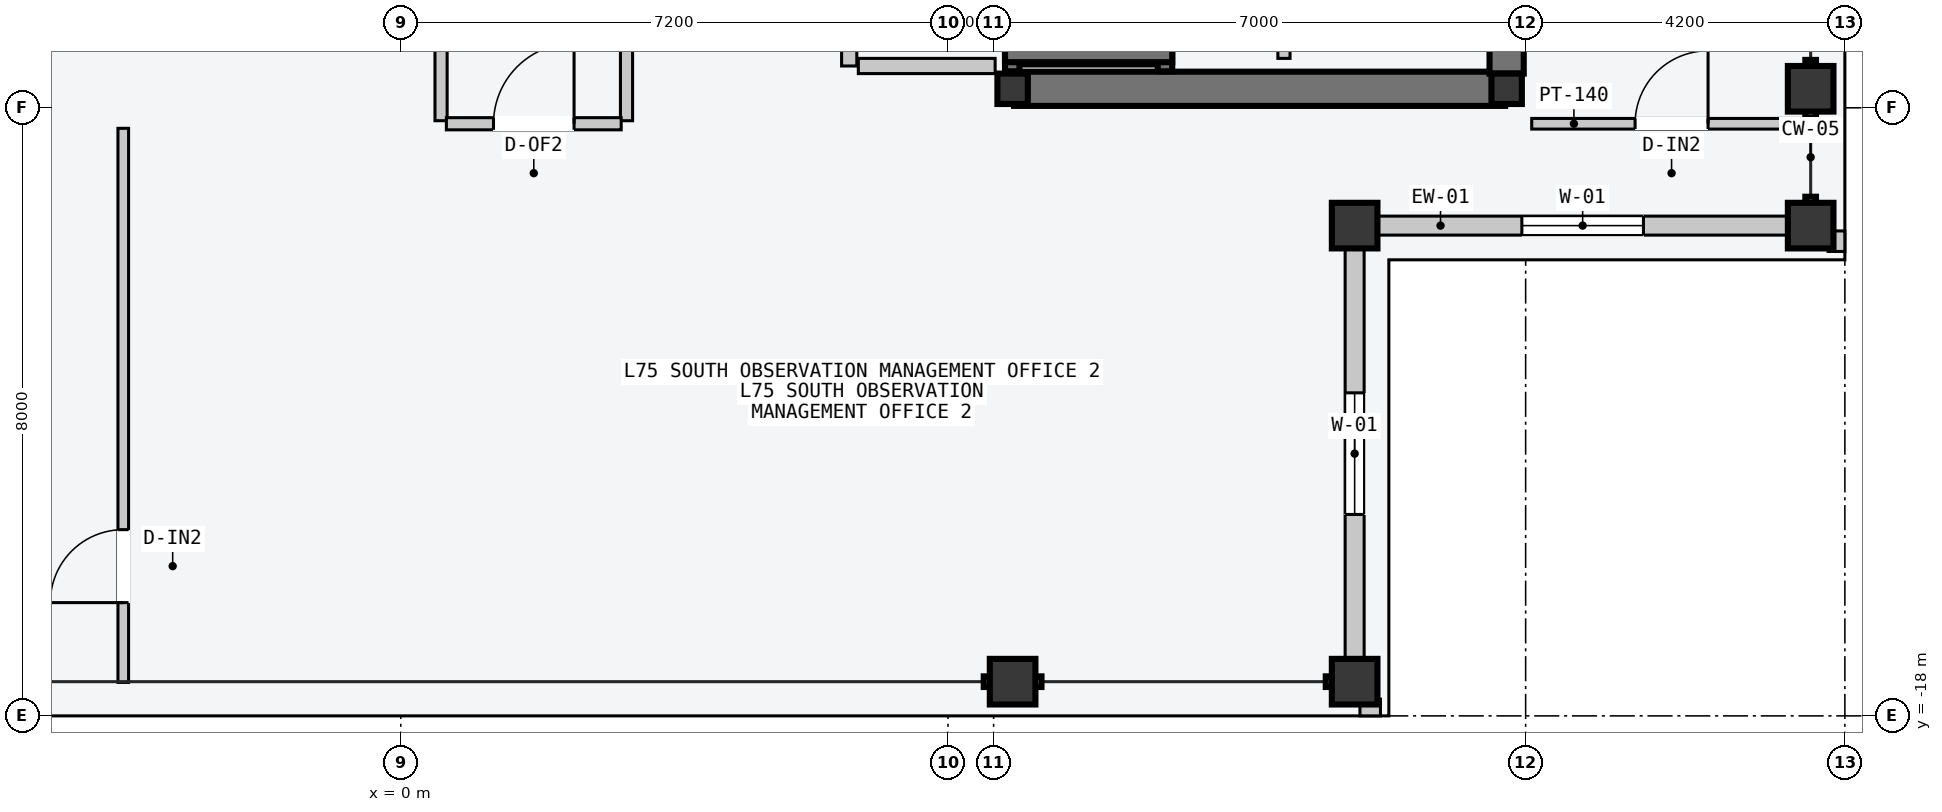
"""IFC4 building model, lengths in metres.
Left out: names, types, materials, properties, quantities, classifications, styles, units other than length and angle.
Written with IfcOpenShell. Run it as: python <this file> out.ifc"""

import sys

from ifc_helpers import new_model, si_unit, direction, frame, frame_2d, origin, origin_2d, place, context, subcontext, project, spatial, rectangle, hollow_rectangle, i_section, extrude, element, fill, save


model = new_model("IFC4")
c1 = context("Model", 3, precision=1e-05, world=origin(), true_north=direction((0.0, 1.0)))
c2 = subcontext(c1, "Body", "Model", "MODEL_VIEW")
j1 = project(units=[si_unit("LENGTHUNIT", "METRE"), si_unit("PLANEANGLEUNIT", "RADIAN")], contexts=[c1])
p1 = place(None, origin())
s1 = spatial("IfcSite", under=j1, at=p1, CompositionType="ELEMENT")
p2 = place(p1, origin())
s2 = spatial("IfcBuilding", under=s1, at=p2, CompositionType="ELEMENT")
p3 = place(p2, frame((0.0, 0.0, 284.4)))
s3 = spatial("IfcBuildingStorey", under=s2, at=p3, CompositionType="ELEMENT", Elevation=284.4)
p4 = place(p3, frame((8.07, -9.75, -0.2), z_axis=(0.0, 0.0, 1.0), x_axis=(1.0, 0.0, 0.0)))
e1 = element("IfcWall", 1, at=p4, inside=s3, PredefinedType="SHEAR", context=c2, shape_type="SweptSolid", body=[
    extrude(rectangle(XDim=6.46, YDim=0.45, at=frame_2d((3.23, 0.0))), origin(), (0.0, 0.0, 1.0), 4.8),
])
p5 = place(p3, frame((14.55, -9.55, -0.2), z_axis=(0.0, 0.0, 1.0), x_axis=(0.0, 1.0, 0.0)))
e2 = element("IfcWall", 2, at=p5, inside=s3, PredefinedType="SHEAR", context=c2, shape_type="SweptSolid", body=[
    extrude(rectangle(XDim=9.35, YDim=0.45, at=frame_2d((4.675, 0.0))), origin(), (0.0, 0.0, 1.0), 4.8),
])
for number, where, z_axis, x_axis in (
    (3, (8.05, -9.75, 0.0), (0.0, 0.0, 1.0), (1.0, 0.0, 0.0)),
    (4, (14.55, -9.75, 0.0), (0.0, 0.0, 1.0), (1.0, 0.0, 0.0)),
):
    element("IfcColumn", number, at=place(p3, frame(where, z_axis=z_axis, x_axis=x_axis)), inside=s3, PredefinedType="COLUMN", context=c2, shape_type="SweptSolid", body=[
        extrude(i_section(OverallWidth=0.4, OverallDepth=0.4, WebThickness=0.013, FlangeThickness=0.021, at=origin_2d()), origin(), (0.0, 0.0, 1.0), 4.8),
    ])
for number, where, z_axis, x_axis in (
    (5, (8.05, -17.55, 0.0), (0.0, 0.0, 1.0), (1.0, 0.0, 0.0)),
    (6, (12.55, -17.55, 0.0), (0.0, 0.0, 1.0), (1.0, 0.0, 0.0)),
    (7, (18.55, -11.55, 0.0), (0.0, 0.0, 1.0), (0.0, 1.0, 0.0)),
    (8, (18.55, -9.75, 0.0), (0.0, 0.0, 1.0), (0.0, 1.0, 0.0)),
    (9, (12.55, -11.55, 0.0), (0.0, 0.0, 1.0), (1.0, 0.0, 0.0)),
):
    element("IfcColumn", number, at=place(p3, frame(where, z_axis=z_axis, x_axis=x_axis)), inside=s3, PredefinedType="COLUMN", context=c2, shape_type="SweptSolid", body=[
        extrude(hollow_rectangle(XDim=0.6, YDim=0.6, WallThickness=0.025, at=origin_2d()), origin(), (0.0, 0.0, 1.0), 4.8),
    ])
p6 = place(p3, frame((12.86, -11.55, 0.0), z_axis=(0.0, 0.0, 1.0), x_axis=(1.0, 0.0, 0.0)))
e10 = element("IfcWall", 10, at=p6, inside=s3, PredefinedType="STANDARD", context=c2, shape_type="SweptSolid", body=[
    extrude(rectangle(XDim=5.38, YDim=0.25, at=frame_2d((2.69, 0.0))), origin(), (0.0, 0.0, 1.0), 4.05),
])
p7 = place(p6, frame((1.89, 0.0, 0.85)))
e11 = element("IfcOpeningElement", 11, at=p7, cuts=e10, PredefinedType="OPENING", context=c2, shape_type="SweptSolid", body=[
    extrude(rectangle(XDim=1.6, YDim=2.0, at=frame_2d((0.8, 1.0))), frame((0.0, 0.135, 0.0), z_axis=(0.0, -1.0, 0.0), x_axis=(1.0, 0.0, 0.0)), (0.0, 0.0, 1.0), 0.27),
])
p8 = place(p3, frame((12.55, -17.24, 0.0), z_axis=(0.0, 0.0, 1.0), x_axis=(0.0, 1.0, 0.0)))
e12 = element("IfcWall", 12, at=p8, inside=s3, PredefinedType="STANDARD", context=c2, shape_type="SweptSolid", body=[
    extrude(rectangle(XDim=5.38, YDim=0.25, at=frame_2d((2.69, 0.0))), origin(), (0.0, 0.0, 1.0), 4.05),
])
p9 = place(p8, frame((1.89, 0.0, 0.85)))
e13 = element("IfcOpeningElement", 13, at=p9, cuts=e12, PredefinedType="OPENING", context=c2, shape_type="SweptSolid", body=[
    extrude(rectangle(XDim=1.6, YDim=2.0, at=frame_2d((0.8, 1.0))), frame((0.0, 0.135, 0.0), z_axis=(0.0, -1.0, 0.0), x_axis=(1.0, 0.0, 0.0)), (0.0, 0.0, 1.0), 0.27),
])
for number, where, z_axis, x_axis in (
    (14, (12.62, -17.89, 0.0), (0.0, 0.0, 1.0), (1.0, 0.0, 0.0)),
    (15, (18.89, -11.89, 0.0), (0.0, 0.0, 1.0), (0.0, 1.0, 0.0)),
):
    element("IfcWall", number, at=place(p3, frame(where, z_axis=z_axis, x_axis=x_axis)), inside=s3, PredefinedType="PARAPET", context=c2, shape_type="SweptSolid", body=[
        extrude(rectangle(XDim=0.27, YDim=0.22, at=frame_2d((0.135, 0.0))), origin(), (0.0, 0.0, 1.0), 1.2),
    ])
p10 = place(p3, frame((8.045, -9.52, -0.2), z_axis=(0.0, 0.0, 1.0), x_axis=(0.0, 1.0, 0.0)))
e16 = element("IfcWall", 16, at=p10, inside=s3, PredefinedType="SOLIDWALL", context=c2, shape_type="SweptSolid", body=[
    extrude(rectangle(XDim=2.12, YDim=0.19, at=frame_2d((1.06, 0.0))), origin(), (0.0, 0.0, 1.0), 4.8),
])
p11 = place(p10, frame((0.57, 0.0, 0.2)))
e17 = element("IfcOpeningElement", 17, at=p11, cuts=e16, PredefinedType="OPENING", context=c2, shape_type="SweptSolid", body=[
    extrude(rectangle(XDim=1.1, YDim=2.2, at=frame_2d((0.55, 1.1))), frame((0.0, 0.105, 0.0), z_axis=(0.0, -1.0, 0.0), x_axis=(1.0, 0.0, 0.0)), (0.0, 0.0, 1.0), 0.21),
])
p12 = place(p3, frame((10.055, -9.52, -0.2), z_axis=(0.0, 0.0, 1.0), x_axis=(0.0, 1.0, 0.0)))
e18 = element("IfcWall", 18, at=p12, inside=s3, PredefinedType="SOLIDWALL", context=c2, shape_type="SweptSolid", body=[
    extrude(rectangle(XDim=2.12, YDim=0.19, at=frame_2d((1.06, 0.0))), origin(), (0.0, 0.0, 1.0), 4.8),
])
p13 = place(p3, frame((7.95, -9.305, -0.2), z_axis=(0.0, 0.0, 1.0), x_axis=(1.0, 0.0, 0.0)))
e19 = element("IfcWall", 19, at=p13, inside=s3, PredefinedType="SOLIDWALL", context=c2, shape_type="SweptSolid", body=[
    extrude(rectangle(XDim=2.2, YDim=0.19, at=frame_2d((1.1, 0.0))), origin(), (0.0, 0.0, 1.0), 4.8),
])
p14 = place(p3, frame((5.9, -9.45, 0.0), z_axis=(0.0, 0.0, 1.0), x_axis=(0.0, 1.0, 0.0)))
e20 = element("IfcWall", 20, at=p14, inside=s3, PredefinedType="PARTITIONING", context=c2, shape_type="SweptSolid", body=[
    extrude(rectangle(XDim=10.5, YDim=0.2, at=frame_2d((5.25, 0.0))), origin(), (0.0, 0.0, 1.0), 4.6),
])
p15 = place(p14, frame((3.9, 0.0, 0.0)))
e21 = element("IfcOpeningElement", 21, at=p15, cuts=e20, PredefinedType="OPENING", context=c2, shape_type="SweptSolid", body=[
    extrude(rectangle(XDim=1.5, YDim=2.2, at=frame_2d((0.75, 1.1))), frame((0.0, 0.11, 0.0), z_axis=(0.0, -1.0, 0.0), x_axis=(1.0, 0.0, 0.0)), (0.0, 0.0, 1.0), 0.22),
])
p16 = place(p3, frame((6.02, -9.45, 0.0), z_axis=(0.0, 0.0, 1.0), x_axis=(1.0, 0.0, 0.0)))
e22 = element("IfcWall", 22, at=p16, inside=s3, PredefinedType="PARTITIONING", context=c2, shape_type="SweptSolid", body=[
    extrude(rectangle(XDim=1.8, YDim=0.2, at=frame_2d((0.9, 0.0))), origin(), (0.0, 0.0, 1.0), 4.6),
])
p17 = place(p3, frame((11.62, -9.35, 0.0), z_axis=(0.0, 0.0, 1.0), x_axis=(0.0, 1.0, 0.0)))
e23 = element("IfcWall", 23, at=p17, inside=s3, PredefinedType="PARTITIONING", context=c2, shape_type="SweptSolid", body=[
    extrude(rectangle(XDim=3.85, YDim=0.16, at=frame_2d((1.925, 0.0))), origin(), (0.0, 0.0, 1.0), 4.6),
])
p18 = place(p17, frame((0.512, 0.0, 0.0)))
e24 = element("IfcOpeningElement", 24, at=p18, cuts=e23, PredefinedType="OPENING", context=c2, shape_type="SweptSolid", body=[
    extrude(rectangle(XDim=0.9, YDim=2.15, at=frame_2d((0.45, 1.075))), frame((0.0, 0.09, 0.0), z_axis=(0.0, -1.0, 0.0), x_axis=(1.0, 0.0, 0.0)), (0.0, 0.0, 1.0), 0.18),
])
p19 = place(p17, frame((2.438, 0.0, 0.0)))
e25 = element("IfcOpeningElement", 25, at=p19, cuts=e23, PredefinedType="OPENING", context=c2, shape_type="SweptSolid", body=[
    extrude(rectangle(XDim=0.9, YDim=2.15, at=frame_2d((0.45, 1.075))), frame((0.0, 0.09, 0.0), z_axis=(0.0, -1.0, 0.0), x_axis=(1.0, 0.0, 0.0)), (0.0, 0.0, 1.0), 0.18),
])
p20 = place(p3, frame((0.53, -10.17, 0.0), z_axis=(0.0, 0.0, 1.0), x_axis=(0.0, 1.0, 0.0)))
e26 = element("IfcWall", 26, at=p20, inside=s3, PredefinedType="PARTITIONING", context=c2, shape_type="SweptSolid", body=[
    extrude(rectangle(XDim=4.49, YDim=0.16, at=frame_2d((2.245, 0.0))), origin(), (0.0, 0.0, 1.0), 4.6),
])
p21 = place(p20, frame((1.15, 0.0, 0.0)))
e27 = element("IfcOpeningElement", 27, at=p21, cuts=e26, PredefinedType="OPENING", context=c2, shape_type="SweptSolid", body=[
    extrude(rectangle(XDim=0.96, YDim=2.18, at=frame_2d((0.48, 1.09))), frame((0.0, 0.09, 0.0), z_axis=(0.0, -1.0, 0.0), x_axis=(1.0, 0.0, 0.0)), (0.0, 0.0, 1.0), 0.18),
])
p22 = place(p3, frame((2.97, -10.17, 0.0), z_axis=(0.0, 0.0, 1.0), x_axis=(0.0, 1.0, 0.0)))
e28 = element("IfcWall", 28, at=p22, inside=s3, PredefinedType="PARTITIONING", context=c2, shape_type="SweptSolid", body=[
    extrude(rectangle(XDim=4.49, YDim=0.16, at=frame_2d((2.245, 0.0))), origin(), (0.0, 0.0, 1.0), 4.6),
])
p23 = place(p22, frame((1.15, 0.0, 0.0)))
e29 = element("IfcOpeningElement", 29, at=p23, cuts=e28, PredefinedType="OPENING", context=c2, shape_type="SweptSolid", body=[
    extrude(rectangle(XDim=0.96, YDim=2.18, at=frame_2d((0.48, 1.09))), frame((0.0, 0.09, 0.0), z_axis=(0.0, -1.0, 0.0), x_axis=(1.0, 0.0, 0.0)), (0.0, 0.0, 1.0), 0.18),
])
p24 = place(p3, frame((-3.651, -17.56, 0.0), z_axis=(0.0, 0.0, 1.0), x_axis=(0.0, 1.0, 0.0)))
e30 = element("IfcWall", 30, at=p24, inside=s3, PredefinedType="PARTITIONING", context=c2, shape_type="SweptSolid", body=[
    extrude(rectangle(XDim=7.29, YDim=0.14, at=frame_2d((3.645, 0.0))), origin(), (0.0, 0.0, 1.0), 4.6),
])
p25 = place(p24, frame((1.05, 0.0, 0.0)))
e31 = element("IfcOpeningElement", 31, at=p25, cuts=e30, PredefinedType="OPENING", context=c2, shape_type="SweptSolid", body=[
    extrude(rectangle(XDim=0.96, YDim=2.18, at=frame_2d((0.48, 1.09))), frame((0.0, 0.08, 0.0), z_axis=(0.0, -1.0, 0.0), x_axis=(1.0, 0.0, 0.0)), (0.0, 0.0, 1.0), 0.16),
])
p26 = place(p3, frame((0.6, -10.21, 0.0), z_axis=(0.0, 0.0, 1.0), x_axis=(1.0, 0.0, 0.0)))
e32 = element("IfcWall", 32, at=p26, inside=s3, PredefinedType="PARTITIONING", context=c2, shape_type="SweptSolid", body=[
    extrude(rectangle(XDim=2.3, YDim=0.16, at=frame_2d((1.15, 0.0))), origin(), (0.0, 0.0, 1.0), 4.6),
])
p27 = place(p26, frame((0.62, 0.0, 0.0)))
e33 = element("IfcOpeningElement", 33, at=p27, cuts=e32, PredefinedType="OPENING", context=c2, shape_type="SweptSolid", body=[
    extrude(rectangle(XDim=1.06, YDim=2.2, at=frame_2d((0.53, 1.1))), frame((0.0, 0.09, 0.0), z_axis=(0.0, -1.0, 0.0), x_axis=(1.0, 0.0, 0.0)), (0.0, 0.0, 1.0), 0.18),
])
p28 = place(p3, frame((14.88, -10.21, 0.0), z_axis=(0.0, 0.0, 1.0), x_axis=(1.0, 0.0, 0.0)))
e34 = element("IfcWall", 34, at=p28, inside=s3, PredefinedType="PARTITIONING", context=c2, shape_type="SweptSolid", body=[
    extrude(rectangle(XDim=3.68, YDim=0.14, at=frame_2d((1.84, 0.0))), origin(), (0.0, 0.0, 1.0), 4.6),
])
p29 = place(p28, frame((1.36, 0.0, 0.0)))
e35 = element("IfcOpeningElement", 35, at=p29, cuts=e34, PredefinedType="OPENING", context=c2, shape_type="SweptSolid", body=[
    extrude(rectangle(XDim=0.96, YDim=2.18, at=frame_2d((0.48, 1.09))), frame((0.0, 0.08, 0.0), z_axis=(0.0, -1.0, 0.0), x_axis=(1.0, 0.0, 0.0)), (0.0, 0.0, 1.0), 0.16),
])
p30 = place(p7, origin())
e36 = element("IfcWindow", 36, at=p30, inside=s3, PartitioningType="SINGLE_PANEL", PredefinedType="WINDOW", context=c2, shape_type="SweptSolid", body=[
    extrude(rectangle(XDim=1.6, YDim=2.0, at=frame_2d((0.8, 1.0))), frame((0.0, 0.03, 0.0), z_axis=(0.0, -1.0, 0.0), x_axis=(1.0, 0.0, 0.0)), (0.0, 0.0, 1.0), 0.06),
])
fill(e11, e36)
p31 = place(p9, origin())
e37 = element("IfcWindow", 37, at=p31, inside=s3, PartitioningType="SINGLE_PANEL", PredefinedType="WINDOW", context=c2, shape_type="SweptSolid", body=[
    extrude(rectangle(XDim=1.6, YDim=2.0, at=frame_2d((0.8, 1.0))), frame((0.0, 0.03, 0.0), z_axis=(0.0, -1.0, 0.0), x_axis=(1.0, 0.0, 0.0)), (0.0, 0.0, 1.0), 0.06),
])
fill(e13, e37)
p32 = place(p25, origin())
e38 = element("IfcDoor", 38, at=p32, inside=s3, OperationType="SINGLE_SWING_LEFT", PredefinedType="DOOR", context=c2, shape_type="SweptSolid", body=[
    extrude(rectangle(XDim=0.96, YDim=2.18, at=frame_2d((0.48, 1.09))), frame((0.0, 0.025, 0.0), z_axis=(0.0, -1.0, 0.0), x_axis=(1.0, 0.0, 0.0)), (0.0, 0.0, 1.0), 0.05),
])
fill(e31, e38)
p33 = place(p27, origin())
e39 = element("IfcDoor", 39, at=p33, inside=s3, OperationType="SINGLE_SWING_RIGHT", PredefinedType="DOOR", context=c2, shape_type="SweptSolid", body=[
    extrude(rectangle(XDim=1.06, YDim=2.2, at=frame_2d((0.53, 1.1))), frame((0.0, 0.025, 0.0), z_axis=(0.0, -1.0, 0.0), x_axis=(1.0, 0.0, 0.0)), (0.0, 0.0, 1.0), 0.05),
])
fill(e33, e39)
p34 = place(p29, origin())
e40 = element("IfcDoor", 40, at=p34, inside=s3, OperationType="SINGLE_SWING_RIGHT", PredefinedType="DOOR", context=c2, shape_type="SweptSolid", body=[
    extrude(rectangle(XDim=0.96, YDim=2.18, at=frame_2d((0.48, 1.09))), frame((0.0, 0.025, 0.0), z_axis=(0.0, -1.0, 0.0), x_axis=(1.0, 0.0, 0.0)), (0.0, 0.0, 1.0), 0.05),
])
fill(e35, e40)
save(model, sys.argv[1])
